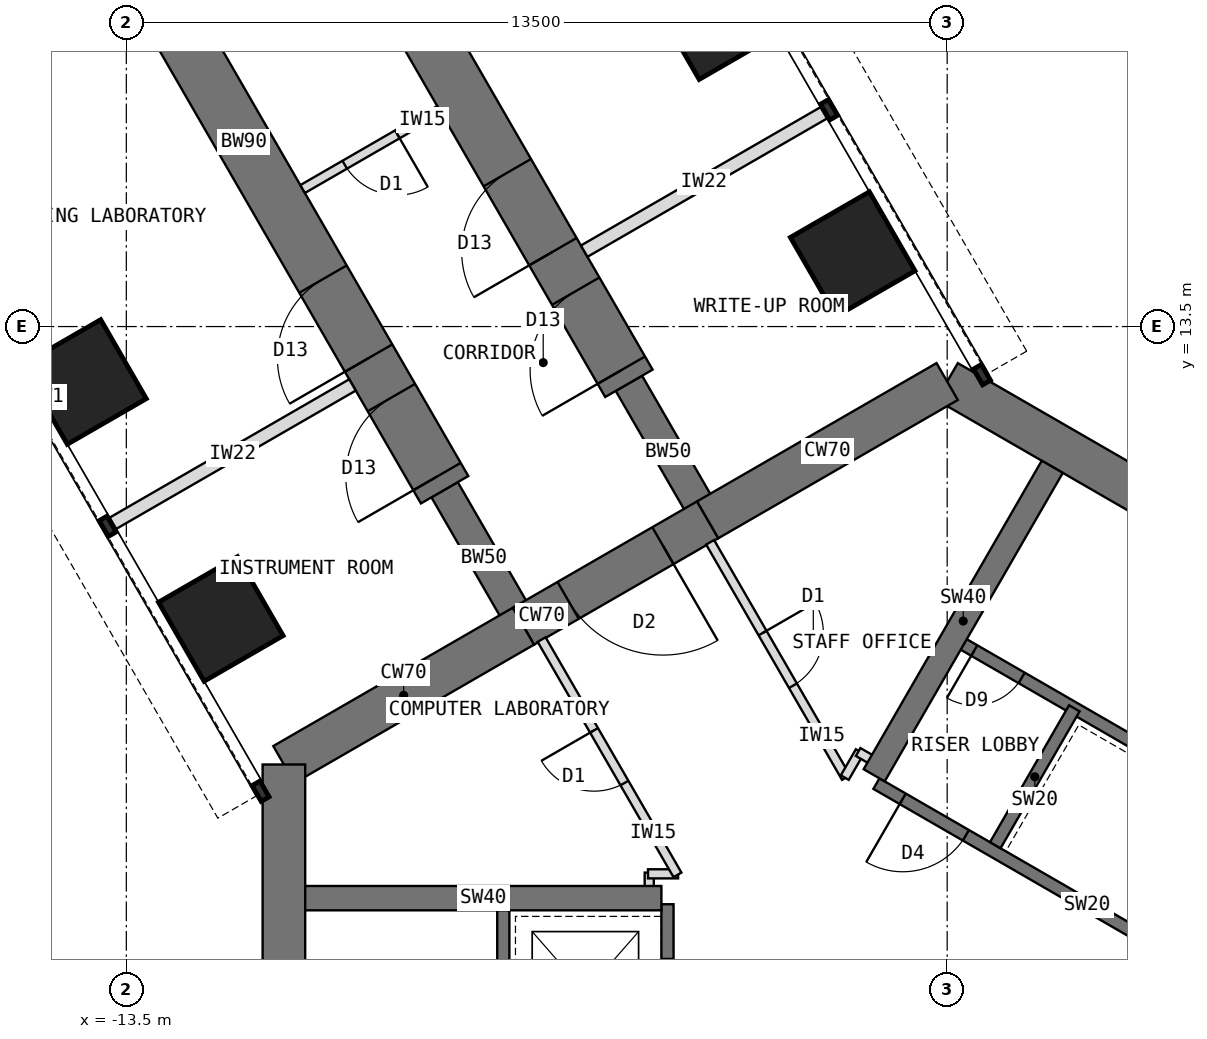
"""IFC4 building model, lengths in metres.
Left out: names, types, materials, properties, quantities, classifications, styles, units other than length and angle.
Written with IfcOpenShell. Run it as: python <this file> out.ifc"""

import sys

from ifc_helpers import new_model, si_unit, direction, frame, frame_2d, origin, origin_2d, place, context, subcontext, project, spatial, rectangle, extrude, element, fill, save


model = new_model("IFC4")
c1 = context("Model", 3, precision=1e-05, world=origin(), true_north=direction((0.0, 1.0)))
c2 = subcontext(c1, "Body", "Model", "MODEL_VIEW")
j1 = project(units=[si_unit("LENGTHUNIT", "METRE"), si_unit("PLANEANGLEUNIT", "RADIAN")], contexts=[c1])
p1 = place(None, origin())
s1 = spatial("IfcSite", under=j1, at=p1, CompositionType="ELEMENT")
p2 = place(p1, origin())
s2 = spatial("IfcBuilding", under=s1, at=p2, CompositionType="ELEMENT")
p3 = place(p2, frame((0.0, 0.0, 24.5)))
s3 = spatial("IfcBuildingStorey", under=s2, at=p3, CompositionType="ELEMENT", Elevation=24.5)
p4 = place(p3, frame((10.908, 6.298, 0.0), z_axis=(0.0, 0.0, 1.0), x_axis=(-0.866021940709, 0.500005998175, 0.0)))
e1 = element("IfcWall", 1, at=p4, inside=s3, PredefinedType="SHEAR", context=c2, shape_type="SweptSolid", body=[
    extrude(rectangle(XDim=12.596, YDim=0.7, at=frame_2d((6.298, 0.0))), origin(), (0.0, 0.0, 1.0), 4.0),
])
p5 = place(p3, frame((0.0, 12.596, 0.0), z_axis=(0.0, 0.0, 1.0), x_axis=(-0.866011268655, -0.500024481964, 0.0)))
e2 = element("IfcWall", 2, at=p5, inside=s3, PredefinedType="SHEAR", context=c2, shape_type="SweptSolid", body=[
    extrude(rectangle(XDim=4.548, YDim=0.7, at=frame_2d((2.274, 0.0))), origin(), (0.0, 0.0, 1.0), 4.0),
])
p6 = place(p3, frame((-3.939, 10.322, 0.0), z_axis=(0.0, 0.0, 1.0), x_axis=(-0.866019471182, -0.500010275428, 0.0)))
e3 = element("IfcWall", 3, at=p6, inside=s3, PredefinedType="SHEAR", context=c2, shape_type="SweptSolid", body=[
    extrude(rectangle(XDim=3.5, YDim=0.7, at=frame_2d((1.75, 0.0))), origin(), (0.0, 0.0, 1.0), 4.0),
])
p7 = place(p6, frame((0.85, 0.0, 0.0)))
e4 = element("IfcOpeningElement", 4, at=p7, cuts=e3, PredefinedType="OPENING", context=c2, shape_type="SweptSolid", body=[
    extrude(rectangle(XDim=1.8, YDim=2.1, at=frame_2d((0.9, 1.05))), frame((0.0, 0.36, 0.0), z_axis=(0.0, -1.0, 0.0), x_axis=(1.0, 0.0, 0.0)), (0.0, 0.0, 1.0), 0.72),
])
p8 = place(p3, frame((-6.97, 8.572, 0.0), z_axis=(0.0, 0.0, 1.0), x_axis=(-0.866034513004, -0.499984222037, 0.0)))
e5 = element("IfcWall", 5, at=p8, inside=s3, PredefinedType="SHEAR", context=c2, shape_type="SweptSolid", body=[
    extrude(rectangle(XDim=4.548, YDim=0.7, at=frame_2d((2.274, 0.0))), origin(), (0.0, 0.0, 1.0), 4.0),
])
p9 = place(p3, frame((-10.908, 6.298, 0.0), z_axis=(0.0, 0.0, 1.0), x_axis=(0.0, -1.0, 0.0)))
e6 = element("IfcWall", 6, at=p9, inside=s3, PredefinedType="SHEAR", context=c2, shape_type="SweptSolid", body=[
    extrude(rectangle(XDim=12.596, YDim=0.7, at=frame_2d((6.298, 0.0))), origin(), (0.0, 0.0, 1.0), 4.0),
])
p10 = place(p3, frame((-6.97, 8.572, 0.0), z_axis=(0.0, 0.0, 1.0), x_axis=(-0.499988811324, 0.866031863473, 0.0)))
e7 = element("IfcWall", 7, at=p10, inside=s3, PredefinedType="SHEAR", context=c2, shape_type="SweptSolid", body=[
    extrude(rectangle(XDim=2.592, YDim=0.5, at=frame_2d((1.296, 0.0))), origin(), (0.0, 0.0, 1.0), 4.0),
])
p11 = place(p3, frame((-8.266, 10.816, 0.0), z_axis=(0.0, 0.0, 1.0), x_axis=(-0.499996231654, 0.866027579429, 0.0)))
e8 = element("IfcWall", 8, at=p11, inside=s3, PredefinedType="SHEAR", context=c2, shape_type="SweptSolid", body=[
    extrude(rectangle(XDim=13.2, YDim=0.9, at=frame_2d((6.6, 0.0))), origin(), (0.0, 0.0, 1.0), 4.0),
])
p12 = place(p11, frame((0.25, 0.0, 0.0)))
e9 = element("IfcOpeningElement", 9, at=p12, cuts=e8, PredefinedType="OPENING", context=c2, shape_type="SweptSolid", body=[
    extrude(rectangle(XDim=1.5, YDim=2.1, at=frame_2d((0.75, 1.05))), frame((0.0, 0.46, 0.0), z_axis=(0.0, -1.0, 0.0), x_axis=(1.0, 0.0, 0.0)), (0.0, 0.0, 1.0), 0.92),
])
p13 = place(p11, frame((2.5, 0.0, 0.0)))
e10 = element("IfcOpeningElement", 10, at=p13, cuts=e8, PredefinedType="OPENING", context=c2, shape_type="SweptSolid", body=[
    extrude(rectangle(XDim=1.5, YDim=2.1, at=frame_2d((0.75, 1.05))), frame((0.0, 0.46, 0.0), z_axis=(0.0, -1.0, 0.0), x_axis=(1.0, 0.0, 0.0)), (0.0, 0.0, 1.0), 0.92),
])
p14 = place(p3, frame((-3.939, 10.322, 0.0), z_axis=(0.0, 0.0, 1.0), x_axis=(-0.499918158782, 0.866072649678, 0.0)))
e11 = element("IfcWall", 11, at=p14, inside=s3, PredefinedType="SHEAR", context=c2, shape_type="SweptSolid", body=[
    extrude(rectangle(XDim=2.592, YDim=0.5, at=frame_2d((1.296, 0.0))), origin(), (0.0, 0.0, 1.0), 4.0),
])
p15 = place(p3, frame((-5.234, 12.566, 0.0), z_axis=(0.0, 0.0, 1.0), x_axis=(-0.500010103361, 0.866019570528, 0.0)))
e12 = element("IfcWall", 12, at=p15, inside=s3, PredefinedType="SHEAR", context=c2, shape_type="SweptSolid", body=[
    extrude(rectangle(XDim=13.2, YDim=0.9, at=frame_2d((6.6, 0.0))), origin(), (0.0, 0.0, 1.0), 4.0),
])
p16 = place(p15, frame((0.25, 0.0, 0.0)))
e13 = element("IfcOpeningElement", 13, at=p16, cuts=e12, PredefinedType="OPENING", context=c2, shape_type="SweptSolid", body=[
    extrude(rectangle(XDim=1.5, YDim=2.1, at=frame_2d((0.75, 1.05))), frame((0.0, 0.46, 0.0), z_axis=(0.0, -1.0, 0.0), x_axis=(1.0, 0.0, 0.0)), (0.0, 0.0, 1.0), 0.92),
])
p17 = place(p15, frame((2.5, 0.0, 0.0)))
e14 = element("IfcOpeningElement", 14, at=p17, cuts=e12, PredefinedType="OPENING", context=c2, shape_type="SweptSolid", body=[
    extrude(rectangle(XDim=1.5, YDim=2.1, at=frame_2d((0.75, 1.05))), frame((0.0, 0.46, 0.0), z_axis=(0.0, -1.0, 0.0), x_axis=(1.0, 0.0, 0.0)), (0.0, 0.0, 1.0), 0.92),
])
for number, where, z_axis, x_axis in (
    (15, (-11.946, 8.691, 0.0), (0.0, 0.0, 1.0), (0.866, 0.5, 0.0)),
    (16, (-1.554, 14.691, 0.0), (0.0, 0.0, 1.0), (0.866, 0.5, 0.0)),
    (17, (-14.196, 12.588, 0.0), (0.0, 0.0, 1.0), (0.866, 0.5, 0.0)),
    (18, (-3.804, 18.588, 0.0), (0.0, 0.0, 1.0), (0.866, 0.5, 0.0)),
):
    element("IfcColumn", number, at=place(p3, frame(where, z_axis=z_axis, x_axis=x_axis)), inside=s3, PredefinedType="COLUMN", context=c2, shape_type="SweptSolid", body=[
        extrude(rectangle(XDim=1.5, YDim=1.5, at=origin_2d()), origin(), (0.0, 0.0, 1.0), 4.0),
    ])
p18 = place(p3, frame((5.764, 1.984, 0.0), z_axis=(0.0, 0.0, 1.0), x_axis=(-0.866026010844, 0.49999894854, 0.0)))
e19 = element("IfcWall", 19, at=p18, inside=s3, PredefinedType="SHEAR", context=c2, shape_type="SweptSolid", body=[
    extrude(rectangle(XDim=8.0, YDim=0.2, at=frame_2d((4.0, 0.0))), origin(), (0.0, 0.0, 1.0), 4.0),
])
p19 = place(p18, frame((6.3, 0.0, 0.0)))
e20 = element("IfcOpeningElement", 20, at=p19, cuts=e19, PredefinedType="OPENING", context=c2, shape_type="SweptSolid", body=[
    extrude(rectangle(XDim=1.2, YDim=2.1, at=frame_2d((0.6, 1.05))), frame((0.0, 0.11, 0.0), z_axis=(0.0, -1.0, 0.0), x_axis=(1.0, 0.0, 0.0)), (0.0, 0.0, 1.0), 0.22),
])
p20 = place(p3, frame((0.791, 4.97, 0.0), z_axis=(0.0, 0.0, 1.0), x_axis=(0.499936506574, 0.866062058628, 0.0)))
e21 = element("IfcWall", 21, at=p20, inside=s3, PredefinedType="SHEAR", context=c2, shape_type="SweptSolid", body=[
    extrude(rectangle(XDim=2.6, YDim=0.2, at=frame_2d((1.3, 0.0))), origin(), (0.0, 0.0, 1.0), 4.0),
])
p21 = place(p3, frame((7.114, 4.322, 0.0), z_axis=(0.0, 0.0, 1.0), x_axis=(-0.866026010844, 0.49999894854, 0.0)))
e22 = element("IfcWall", 22, at=p21, inside=s3, PredefinedType="SHEAR", context=c2, shape_type="SweptSolid", body=[
    extrude(rectangle(XDim=8.0, YDim=0.2, at=frame_2d((4.0, 0.0))), origin(), (0.0, 0.0, 1.0), 4.0),
])
p22 = place(p21, frame((6.8, 0.0, 0.0)))
e23 = element("IfcOpeningElement", 23, at=p22, cuts=e22, PredefinedType="OPENING", context=c2, shape_type="SweptSolid", body=[
    extrude(rectangle(XDim=0.9, YDim=2.1, at=frame_2d((0.45, 1.05))), frame((0.0, 0.11, 0.0), z_axis=(0.0, -1.0, 0.0), x_axis=(1.0, 0.0, 0.0)), (0.0, 0.0, 1.0), 0.22),
])
p23 = place(p3, frame((-1.201, 6.12, 0.0), z_axis=(0.0, 0.0, 1.0), x_axis=(0.500002627198, 0.866023886965, 0.0)))
e24 = element("IfcWall", 24, at=p23, inside=s3, PredefinedType="SHEAR", context=c2, shape_type="SweptSolid", body=[
    extrude(rectangle(XDim=5.858, YDim=0.4, at=frame_2d((2.929, 0.0))), origin(), (0.0, 0.0, 1.0), 4.0),
])
p24 = place(p3, frame((-4.6, 4.0, 0.0), z_axis=(0.0, 0.0, 1.0), x_axis=(0.0, -1.0, 0.0)))
e25 = element("IfcWall", 25, at=p24, inside=s3, PredefinedType="SHEAR", context=c2, shape_type="SweptSolid", body=[
    extrude(rectangle(XDim=8.0, YDim=0.2, at=frame_2d((4.0, 0.0))), origin(), (0.0, 0.0, 1.0), 4.0),
])
p25 = place(p24, frame((6.3, 0.0, 0.0)))
e26 = element("IfcOpeningElement", 26, at=p25, cuts=e25, PredefinedType="OPENING", context=c2, shape_type="SweptSolid", body=[
    extrude(rectangle(XDim=1.2, YDim=2.1, at=frame_2d((0.6, 1.05))), frame((0.0, 0.11, 0.0), z_axis=(0.0, -1.0, 0.0), x_axis=(1.0, 0.0, 0.0)), (0.0, 0.0, 1.0), 0.22),
])
p26 = place(p24, frame((0.9, 0.0, 0.0)))
e27 = element("IfcOpeningElement", 27, at=p26, cuts=e25, PredefinedType="OPENING", context=c2, shape_type="SweptSolid", body=[
    extrude(rectangle(XDim=1.1, YDim=2.2, at=frame_2d((0.55, 1.1))), frame((0.0, 0.11, 0.0), z_axis=(0.0, -1.0, 0.0), x_axis=(1.0, 0.0, 0.0)), (0.0, 0.0, 1.0), 0.22),
])
p27 = place(p3, frame((-7.3, 4.0, 0.0), z_axis=(0.0, 0.0, 1.0), x_axis=(0.0, -1.0, 0.0)))
e28 = element("IfcWall", 28, at=p27, inside=s3, PredefinedType="SHEAR", context=c2, shape_type="SweptSolid", body=[
    extrude(rectangle(XDim=8.0, YDim=0.2, at=frame_2d((4.0, 0.0))), origin(), (0.0, 0.0, 1.0), 4.0),
])
p28 = place(p27, frame((6.7, 0.0, 0.0)))
e29 = element("IfcOpeningElement", 29, at=p28, cuts=e28, PredefinedType="OPENING", context=c2, shape_type="SweptSolid", body=[
    extrude(rectangle(XDim=1.1, YDim=2.1, at=frame_2d((0.55, 1.05))), frame((0.0, 0.11, 0.0), z_axis=(0.0, -1.0, 0.0), x_axis=(1.0, 0.0, 0.0)), (0.0, 0.0, 1.0), 0.22),
])
p29 = place(p3, frame((-4.7, 4.1, 0.0), z_axis=(0.0, 0.0, 1.0), x_axis=(-1.0, 0.0, 0.0)))
e30 = element("IfcWall", 30, at=p29, inside=s3, PredefinedType="SHEAR", context=c2, shape_type="SweptSolid", body=[
    extrude(rectangle(XDim=5.858, YDim=0.4, at=frame_2d((2.929, 0.0))), origin(), (0.0, 0.0, 1.0), 4.0),
])
for number, where, z_axis, x_axis in (
    (31, (-9.78, 12.54, 0.0), (0.0, 0.0, 1.0), (-0.866, -0.5, 0.0)),
    (32, (-5.97, 14.74, 0.0), (0.0, 0.0, 1.0), (0.866, 0.5, 0.0)),
):
    element("IfcWall", number, at=place(p3, frame(where, z_axis=z_axis, x_axis=x_axis)), inside=s3, PredefinedType="PARTITIONING", context=c2, shape_type="SweptSolid", body=[
        extrude(rectangle(XDim=4.55, YDim=0.215, at=frame_2d((2.275, 0.0))), origin(), (0.0, 0.0, 1.0), 3.8),
    ])
p30 = place(p3, frame((-4.9, 4.09, 0.0), z_axis=(0.0, 0.0, 1.0), x_axis=(0.0, 1.0, 0.0)))
e33 = element("IfcWall", 33, at=p30, inside=s3, PredefinedType="PARTITIONING", context=c2, shape_type="SweptSolid", body=[
    extrude(rectangle(XDim=0.43, YDim=0.15, at=frame_2d((0.215, 0.0))), origin(), (0.0, 0.0, 1.0), 3.8),
])
p31 = place(p3, frame((-4.92, 4.5, 0.0), z_axis=(0.0, 0.0, 1.0), x_axis=(1.0, 0.0, 0.0)))
e34 = element("IfcWall", 34, at=p31, inside=s3, PredefinedType="PARTITIONING", context=c2, shape_type="SweptSolid", body=[
    extrude(rectangle(XDim=0.494, YDim=0.15, at=frame_2d((0.247, 0.0))), origin(), (0.0, 0.0, 1.0), 3.8),
])
p32 = place(p3, frame((-4.436, 4.483, 0.0), z_axis=(0.0, 0.0, 1.0), x_axis=(-0.500017246033, 0.866015446554, 0.0)))
e35 = element("IfcWall", 35, at=p32, inside=s3, PredefinedType="PARTITIONING", context=c2, shape_type="SweptSolid", body=[
    extrude(rectangle(XDim=4.469, YDim=0.15, at=frame_2d((2.234, 0.0))), origin(), (0.0, 0.0, 1.0), 3.8),
])
p33 = place(p32, frame((1.744, 0.0, 0.0)))
e36 = element("IfcOpeningElement", 36, at=p33, cuts=e35, PredefinedType="OPENING", context=c2, shape_type="SweptSolid", body=[
    extrude(rectangle(XDim=1.0, YDim=2.1, at=frame_2d((0.5, 1.05))), frame((0.0, 0.085, 0.0), z_axis=(0.0, -1.0, 0.0), x_axis=(1.0, 0.0, 0.0)), (0.0, 0.0, 1.0), 0.17),
])
p34 = place(p3, frame((-3.898, 9.952, 0.0), z_axis=(0.0, 0.0, 1.0), x_axis=(0.499999927604, -0.866025445582, 0.0)))
e37 = element("IfcWall", 37, at=p34, inside=s3, PredefinedType="PARTITIONING", context=c2, shape_type="SweptSolid", body=[
    extrude(rectangle(XDim=4.468, YDim=0.15, at=frame_2d((2.234, 0.0))), origin(), (0.0, 0.0, 1.0), 3.8),
])
p35 = place(p34, frame((1.724, 0.0, 0.0)))
e38 = element("IfcOpeningElement", 38, at=p35, cuts=e37, PredefinedType="OPENING", context=c2, shape_type="SweptSolid", body=[
    extrude(rectangle(XDim=1.0, YDim=2.1, at=frame_2d((0.5, 1.05))), frame((0.0, 0.085, 0.0), z_axis=(0.0, -1.0, 0.0), x_axis=(1.0, 0.0, 0.0)), (0.0, 0.0, 1.0), 0.17),
])
p36 = place(p3, frame((-1.684, 6.083, 0.0), z_axis=(0.0, 0.0, 1.0), x_axis=(0.50033519877, 0.865831790172, 0.0)))
e39 = element("IfcWall", 39, at=p36, inside=s3, PredefinedType="PARTITIONING", context=c2, shape_type="SweptSolid", body=[
    extrude(rectangle(XDim=0.494, YDim=0.15, at=frame_2d((0.247, 0.0))), origin(), (0.0, 0.0, 1.0), 3.8),
])
p37 = place(p3, frame((-1.464, 6.503, 0.0), z_axis=(0.0, 0.0, 1.0), x_axis=(0.866138304741, -0.499804398801, 0.0)))
e40 = element("IfcWall", 40, at=p37, inside=s3, PredefinedType="PARTITIONING", context=c2, shape_type="SweptSolid", body=[
    extrude(rectangle(XDim=0.43, YDim=0.15, at=frame_2d((0.215, 0.0))), origin(), (0.0, 0.0, 1.0), 3.8),
])
p38 = place(p3, frame((-8.349, 17.061, 0.0), z_axis=(0.0, 0.0, 1.0), x_axis=(-0.866021400173, -0.500006934395, 0.0)))
e41 = element("IfcWall", 41, at=p38, inside=s3, PredefinedType="PARTITIONING", context=c2, shape_type="SweptSolid", body=[
    extrude(rectangle(XDim=2.6, YDim=0.15, at=frame_2d((1.3, 0.0))), origin(), (0.0, 0.0, 1.0), 3.8),
])
p39 = place(p38, frame((0.8, 0.0, 0.0)))
e42 = element("IfcOpeningElement", 42, at=p39, cuts=e41, PredefinedType="OPENING", context=c2, shape_type="SweptSolid", body=[
    extrude(rectangle(XDim=1.0, YDim=2.1, at=frame_2d((0.5, 1.05))), frame((0.0, 0.085, 0.0), z_axis=(0.0, -1.0, 0.0), x_axis=(1.0, 0.0, 0.0)), (0.0, 0.0, 1.0), 0.17),
])
p40 = place(p19, origin())
e43 = element("IfcDoor", 43, at=p40, inside=s3, OperationType="SINGLE_SWING_RIGHT", PredefinedType="DOOR", context=c2, shape_type="SweptSolid", body=[
    extrude(rectangle(XDim=1.2, YDim=2.1, at=frame_2d((0.6, 1.05))), frame((0.0, 0.025, 0.0), z_axis=(0.0, -1.0, 0.0), x_axis=(1.0, 0.0, 0.0)), (0.0, 0.0, 1.0), 0.05),
])
fill(e20, e43)
p41 = place(p22, origin())
e44 = element("IfcDoor", 44, at=p41, inside=s3, OperationType="SINGLE_SWING_RIGHT", PredefinedType="DOOR", context=c2, shape_type="SweptSolid", body=[
    extrude(rectangle(XDim=0.9, YDim=2.1, at=frame_2d((0.45, 1.05))), frame((0.0, 0.025, 0.0), z_axis=(0.0, -1.0, 0.0), x_axis=(1.0, 0.0, 0.0)), (0.0, 0.0, 1.0), 0.05),
])
fill(e23, e44)
p42 = place(p7, origin())
e45 = element("IfcDoor", 45, at=p42, inside=s3, OperationType="DOUBLE_DOOR_DOUBLE_SWING", PredefinedType="DOOR", context=c2, shape_type="SweptSolid", body=[
    extrude(rectangle(XDim=1.72, YDim=2.06, at=frame_2d((0.9, 1.03))), frame((0.0, 0.025, 0.0), z_axis=(0.0, -1.0, 0.0), x_axis=(1.0, 0.0, 0.0)), (0.0, 0.0, 1.0), 0.05),
    extrude(rectangle(XDim=0.04, YDim=2.1, at=frame_2d((0.02, 1.05))), frame((0.0, 0.35, 0.0), z_axis=(0.0, -1.0, 0.0), x_axis=(1.0, 0.0, 0.0)), (0.0, 0.0, 1.0), 0.699),
    extrude(rectangle(XDim=0.04, YDim=2.1, at=frame_2d((1.78, 1.05))), frame((0.0, 0.35, 0.0), z_axis=(0.0, -1.0, 0.0), x_axis=(1.0, 0.0, 0.0)), (0.0, 0.0, 1.0), 0.699),
    extrude(rectangle(XDim=1.72, YDim=0.04, at=frame_2d((0.9, 2.08))), frame((0.0, 0.35, 0.0), z_axis=(0.0, -1.0, 0.0), x_axis=(1.0, 0.0, 0.0)), (0.0, 0.0, 1.0), 0.699),
])
fill(e4, e45)
p43 = place(p35, origin())
e46 = element("IfcDoor", 46, at=p43, inside=s3, OperationType="SINGLE_SWING_LEFT", PredefinedType="DOOR", context=c2, shape_type="SweptSolid", body=[
    extrude(rectangle(XDim=1.0, YDim=2.1, at=frame_2d((0.5, 1.05))), frame((0.0, 0.025, 0.0), z_axis=(0.0, -1.0, 0.0), x_axis=(1.0, 0.0, 0.0)), (0.0, 0.0, 1.0), 0.05),
])
fill(e38, e46)
p44 = place(p33, origin())
e47 = element("IfcDoor", 47, at=p44, inside=s3, OperationType="SINGLE_SWING_RIGHT", PredefinedType="DOOR", context=c2, shape_type="SweptSolid", body=[
    extrude(rectangle(XDim=1.0, YDim=2.1, at=frame_2d((0.5, 1.05))), frame((0.0, 0.025, 0.0), z_axis=(0.0, -1.0, 0.0), x_axis=(1.0, 0.0, 0.0)), (0.0, 0.0, 1.0), 0.05),
])
fill(e36, e47)
p45 = place(p39, origin())
e48 = element("IfcDoor", 48, at=p45, inside=s3, OperationType="SINGLE_SWING_LEFT", PredefinedType="DOOR", context=c2, shape_type="SweptSolid", body=[
    extrude(rectangle(XDim=1.0, YDim=2.1, at=frame_2d((0.5, 1.05))), frame((0.0, 0.025, 0.0), z_axis=(0.0, -1.0, 0.0), x_axis=(1.0, 0.0, 0.0)), (0.0, 0.0, 1.0), 0.05),
])
fill(e42, e48)
p46 = place(p12, origin())
e49 = element("IfcDoor", 49, at=p46, inside=s3, OperationType="DOUBLE_DOOR_SINGLE_SWING", PredefinedType="DOOR", context=c2, shape_type="SweptSolid", body=[
    extrude(rectangle(XDim=1.42, YDim=2.06, at=frame_2d((0.75, 1.03))), frame((0.0, 0.025, 0.0), z_axis=(0.0, -1.0, 0.0), x_axis=(1.0, 0.0, 0.0)), (0.0, 0.0, 1.0), 0.05),
    extrude(rectangle(XDim=0.04, YDim=2.1, at=frame_2d((0.02, 1.05))), frame((0.0, 0.45, 0.0), z_axis=(0.0, -1.0, 0.0), x_axis=(1.0, 0.0, 0.0)), (0.0, 0.0, 1.0), 0.899),
    extrude(rectangle(XDim=0.04, YDim=2.1, at=frame_2d((1.48, 1.05))), frame((0.0, 0.45, 0.0), z_axis=(0.0, -1.0, 0.0), x_axis=(1.0, 0.0, 0.0)), (0.0, 0.0, 1.0), 0.899),
    extrude(rectangle(XDim=1.42, YDim=0.04, at=frame_2d((0.75, 2.08))), frame((0.0, 0.45, 0.0), z_axis=(0.0, -1.0, 0.0), x_axis=(1.0, 0.0, 0.0)), (0.0, 0.0, 1.0), 0.899),
])
fill(e9, e49)
p47 = place(p13, origin())
e50 = element("IfcDoor", 50, at=p47, inside=s3, OperationType="DOUBLE_DOOR_SINGLE_SWING", PredefinedType="DOOR", context=c2, shape_type="SweptSolid", body=[
    extrude(rectangle(XDim=1.42, YDim=2.06, at=frame_2d((0.75, 1.03))), frame((0.0, 0.025, 0.0), z_axis=(0.0, -1.0, 0.0), x_axis=(1.0, 0.0, 0.0)), (0.0, 0.0, 1.0), 0.05),
    extrude(rectangle(XDim=0.04, YDim=2.1, at=frame_2d((0.02, 1.05))), frame((0.0, 0.45, 0.0), z_axis=(0.0, -1.0, 0.0), x_axis=(1.0, 0.0, 0.0)), (0.0, 0.0, 1.0), 0.899),
    extrude(rectangle(XDim=0.04, YDim=2.1, at=frame_2d((1.48, 1.05))), frame((0.0, 0.45, 0.0), z_axis=(0.0, -1.0, 0.0), x_axis=(1.0, 0.0, 0.0)), (0.0, 0.0, 1.0), 0.899),
    extrude(rectangle(XDim=1.42, YDim=0.04, at=frame_2d((0.75, 2.08))), frame((0.0, 0.45, 0.0), z_axis=(0.0, -1.0, 0.0), x_axis=(1.0, 0.0, 0.0)), (0.0, 0.0, 1.0), 0.899),
])
fill(e10, e50)
p48 = place(p16, origin())
e51 = element("IfcDoor", 51, at=p48, inside=s3, OperationType="DOUBLE_DOOR_SINGLE_SWING", PredefinedType="DOOR", context=c2, shape_type="SweptSolid", body=[
    extrude(rectangle(XDim=1.42, YDim=2.06, at=frame_2d((0.75, 1.03))), frame((0.0, 0.025, 0.0), z_axis=(0.0, -1.0, 0.0), x_axis=(1.0, 0.0, 0.0)), (0.0, 0.0, 1.0), 0.05),
    extrude(rectangle(XDim=0.04, YDim=2.1, at=frame_2d((0.02, 1.05))), frame((0.0, 0.45, 0.0), z_axis=(0.0, -1.0, 0.0), x_axis=(1.0, 0.0, 0.0)), (0.0, 0.0, 1.0), 0.899),
    extrude(rectangle(XDim=0.04, YDim=2.1, at=frame_2d((1.48, 1.05))), frame((0.0, 0.45, 0.0), z_axis=(0.0, -1.0, 0.0), x_axis=(1.0, 0.0, 0.0)), (0.0, 0.0, 1.0), 0.899),
    extrude(rectangle(XDim=1.42, YDim=0.04, at=frame_2d((0.75, 2.08))), frame((0.0, 0.45, 0.0), z_axis=(0.0, -1.0, 0.0), x_axis=(1.0, 0.0, 0.0)), (0.0, 0.0, 1.0), 0.899),
])
fill(e13, e51)
p49 = place(p17, origin())
e52 = element("IfcDoor", 52, at=p49, inside=s3, OperationType="DOUBLE_DOOR_SINGLE_SWING", PredefinedType="DOOR", context=c2, shape_type="SweptSolid", body=[
    extrude(rectangle(XDim=1.42, YDim=2.06, at=frame_2d((0.75, 1.03))), frame((0.0, 0.025, 0.0), z_axis=(0.0, -1.0, 0.0), x_axis=(1.0, 0.0, 0.0)), (0.0, 0.0, 1.0), 0.05),
    extrude(rectangle(XDim=0.04, YDim=2.1, at=frame_2d((0.02, 1.05))), frame((0.0, 0.45, 0.0), z_axis=(0.0, -1.0, 0.0), x_axis=(1.0, 0.0, 0.0)), (0.0, 0.0, 1.0), 0.899),
    extrude(rectangle(XDim=0.04, YDim=2.1, at=frame_2d((1.48, 1.05))), frame((0.0, 0.45, 0.0), z_axis=(0.0, -1.0, 0.0), x_axis=(1.0, 0.0, 0.0)), (0.0, 0.0, 1.0), 0.899),
    extrude(rectangle(XDim=1.42, YDim=0.04, at=frame_2d((0.75, 2.08))), frame((0.0, 0.45, 0.0), z_axis=(0.0, -1.0, 0.0), x_axis=(1.0, 0.0, 0.0)), (0.0, 0.0, 1.0), 0.899),
])
fill(e14, e52)
save(model, sys.argv[1])
